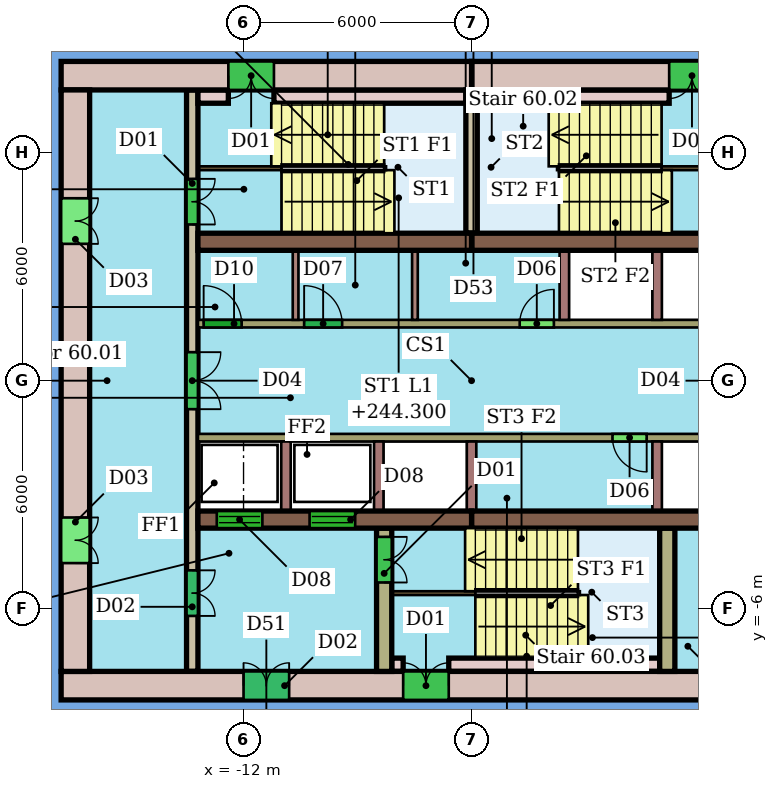
"""IFC4 building model, lengths in metres.
Left out: names, types, materials, properties, quantities, classifications, styles, units other than length and angle.
Written with IfcOpenShell. Run it as: python <this file> out.ifc"""

import sys

from ifc_helpers import new_model, si_unit, direction, frame, frame_2d, origin, place, context, subcontext, project, spatial, rectangle, extrude, element, fill, save


model = new_model("IFC4")
c1 = context("Model", 3, precision=1e-05, world=origin(), true_north=direction((0.0, 1.0)))
c2 = subcontext(c1, "Body", "Model", "MODEL_VIEW")
j1 = project(units=[si_unit("LENGTHUNIT", "METRE"), si_unit("PLANEANGLEUNIT", "RADIAN")], contexts=[c1])
p1 = place(None, origin())
s1 = spatial("IfcSite", under=j1, at=p1, CompositionType="ELEMENT")
p2 = place(p1, origin())
s2 = spatial("IfcBuilding", under=s1, at=p2, CompositionType="ELEMENT")
p3 = place(p2, frame((0.0, 0.0, 242.5)))
s3 = spatial("IfcBuildingStorey", under=s2, at=p3, CompositionType="ELEMENT", Elevation=242.5)
p4 = place(p3, frame((4.8, 8.025, 0.0), z_axis=(0.0, 0.0, 1.0), x_axis=(-1.0, 0.0, 0.0)))
e1 = element("IfcWall", 1, at=p4, inside=s3, PredefinedType="SHEAR", context=c2, shape_type="SweptSolid", body=[
    extrude(rectangle(XDim=10.8, YDim=0.75, at=frame_2d((5.4, 0.0))), origin(), (0.0, 0.0, 1.0), 3.3),
])
p5 = place(p4, frame((4.4, 0.0, 0.0)))
e2 = element("IfcOpeningElement", 2, at=p5, cuts=e1, PredefinedType="OPENING", context=c2, shape_type="SweptSolid", body=[
    extrude(rectangle(XDim=1.2, YDim=2.1, at=frame_2d((0.6, 1.05))), frame((0.0, 0.385, 0.0), z_axis=(0.0, -1.0, 0.0), x_axis=(1.0, 0.0, 0.0)), (0.0, 0.0, 1.0), 0.77),
])
p6 = place(p3, frame((-6.0, 8.025, 0.0), z_axis=(0.0, 0.0, 1.0), x_axis=(-1.0, 0.0, 0.0)))
e3 = element("IfcWall", 3, at=p6, inside=s3, PredefinedType="SHEAR", context=c2, shape_type="SweptSolid", body=[
    extrude(rectangle(XDim=10.8, YDim=0.75, at=frame_2d((5.4, 0.0))), origin(), (0.0, 0.0, 1.0), 3.3),
])
p7 = place(p6, frame((5.2, 0.0, 0.0)))
e4 = element("IfcOpeningElement", 4, at=p7, cuts=e3, PredefinedType="OPENING", context=c2, shape_type="SweptSolid", body=[
    extrude(rectangle(XDim=1.2, YDim=2.1, at=frame_2d((0.6, 1.05))), frame((0.0, 0.385, 0.0), z_axis=(0.0, -1.0, 0.0), x_axis=(1.0, 0.0, 0.0)), (0.0, 0.0, 1.0), 0.77),
])
p8 = place(p3, frame((-16.8, -8.025, 0.0), z_axis=(0.0, 0.0, 1.0), x_axis=(1.0, 0.0, 0.0)))
e5 = element("IfcWall", 5, at=p8, inside=s3, PredefinedType="SHEAR", context=c2, shape_type="SweptSolid", body=[
    extrude(rectangle(XDim=21.6, YDim=0.75, at=frame_2d((10.8, 0.0))), origin(), (0.0, 0.0, 1.0), 3.3),
])
p9 = place(p8, frame((9.0, 0.0, 0.0)))
e6 = element("IfcOpeningElement", 6, at=p9, cuts=e5, PredefinedType="OPENING", context=c2, shape_type="SweptSolid", body=[
    extrude(rectangle(XDim=1.2, YDim=2.1, at=frame_2d((0.6, 1.05))), frame((0.0, 0.385, 0.0), z_axis=(0.0, -1.0, 0.0), x_axis=(1.0, 0.0, 0.0)), (0.0, 0.0, 1.0), 0.77),
])
p10 = place(p8, frame((4.8, 0.0, 0.0)))
e7 = element("IfcOpeningElement", 7, at=p10, cuts=e5, PredefinedType="OPENING", context=c2, shape_type="SweptSolid", body=[
    extrude(rectangle(XDim=1.2, YDim=2.1, at=frame_2d((0.6, 1.05))), frame((0.0, 0.385, 0.0), z_axis=(0.0, -1.0, 0.0), x_axis=(1.0, 0.0, 0.0)), (0.0, 0.0, 1.0), 0.77),
])
p11 = place(p3, frame((-16.425, 7.65, 0.0), z_axis=(0.0, 0.0, 1.0), x_axis=(0.0, -1.0, 0.0)))
e8 = element("IfcWall", 8, at=p11, inside=s3, PredefinedType="SHEAR", context=c2, shape_type="SweptSolid", body=[
    extrude(rectangle(XDim=15.3, YDim=0.75, at=frame_2d((7.65, 0.0))), origin(), (0.0, 0.0, 1.0), 3.3),
])
p12 = place(p11, frame((11.25, 0.0, 0.0)))
e9 = element("IfcOpeningElement", 9, at=p12, cuts=e8, PredefinedType="OPENING", context=c2, shape_type="SweptSolid", body=[
    extrude(rectangle(XDim=1.2, YDim=2.1, at=frame_2d((0.6, 1.05))), frame((0.0, 0.385, 0.0), z_axis=(0.0, -1.0, 0.0), x_axis=(1.0, 0.0, 0.0)), (0.0, 0.0, 1.0), 0.77),
])
p13 = place(p11, frame((2.85, 0.0, 0.0)))
e10 = element("IfcOpeningElement", 10, at=p13, cuts=e8, PredefinedType="OPENING", context=c2, shape_type="SweptSolid", body=[
    extrude(rectangle(XDim=1.2, YDim=2.1, at=frame_2d((0.6, 1.05))), frame((0.0, 0.385, 0.0), z_axis=(0.0, -1.0, 0.0), x_axis=(1.0, 0.0, 0.0)), (0.0, 0.0, 1.0), 0.77),
])
for number, where, z_axis, x_axis in (
    (11, (-13.2, 3.655, 0.0), (0.0, 0.0, 1.0), (1.0, 0.0, 0.0)),
    (12, (-6.0, 3.655, 0.0), (0.0, 0.0, 1.0), (1.0, 0.0, 0.0)),
):
    element("IfcWall", number, at=place(p3, frame(where, z_axis=z_axis, x_axis=x_axis)), inside=s3, PredefinedType="SHEAR", context=c2, shape_type="SweptSolid", body=[
        extrude(rectangle(XDim=7.2, YDim=0.45, at=frame_2d((3.6, 0.0))), origin(), (0.0, 0.0, 1.0), 3.3),
    ])
p14 = place(p3, frame((-13.2, -3.655, 0.0), z_axis=(0.0, 0.0, 1.0), x_axis=(1.0, 0.0, 0.0)))
e13 = element("IfcWall", 13, at=p14, inside=s3, PredefinedType="SHEAR", context=c2, shape_type="SweptSolid", body=[
    extrude(rectangle(XDim=7.2, YDim=0.45, at=frame_2d((3.6, 0.0))), origin(), (0.0, 0.0, 1.0), 3.3),
])
p15 = place(p14, frame((0.496, 0.0, 0.0)))
e14 = element("IfcOpeningElement", 14, at=p15, cuts=e13, PredefinedType="OPENING", context=c2, shape_type="SweptSolid", body=[
    extrude(rectangle(XDim=1.2, YDim=2.1, at=frame_2d((0.6, 1.05))), frame((0.0, 0.235, 0.0), z_axis=(0.0, -1.0, 0.0), x_axis=(1.0, 0.0, 0.0)), (0.0, 0.0, 1.0), 0.47),
])
p16 = place(p14, frame((2.938, 0.0, 0.0)))
e15 = element("IfcOpeningElement", 15, at=p16, cuts=e13, PredefinedType="OPENING", context=c2, shape_type="SweptSolid", body=[
    extrude(rectangle(XDim=1.2, YDim=2.1, at=frame_2d((0.6, 1.05))), frame((0.0, 0.235, 0.0), z_axis=(0.0, -1.0, 0.0), x_axis=(1.0, 0.0, 0.0)), (0.0, 0.0, 1.0), 0.47),
])
p17 = place(p3, frame((-6.0, -3.655, 0.0), z_axis=(0.0, 0.0, 1.0), x_axis=(1.0, 0.0, 0.0)))
e16 = element("IfcWall", 16, at=p17, inside=s3, PredefinedType="SHEAR", context=c2, shape_type="SweptSolid", body=[
    extrude(rectangle(XDim=7.2, YDim=0.45, at=frame_2d((3.6, 0.0))), origin(), (0.0, 0.0, 1.0), 3.3),
])
p18 = place(p3, frame((-13.35, 7.65, 0.0), z_axis=(0.0, 0.0, 1.0), x_axis=(0.0, -1.0, 0.0)))
e17 = element("IfcWall", 17, at=p18, inside=s3, PredefinedType="SHEAR", context=c2, shape_type="SweptSolid", body=[
    extrude(rectangle(XDim=15.3, YDim=0.3, at=frame_2d((7.65, 0.0))), origin(), (0.0, 0.0, 1.0), 3.3),
])
p19 = place(p18, frame((2.34, 0.0, 0.0)))
e18 = element("IfcOpeningElement", 18, at=p19, cuts=e17, PredefinedType="OPENING", context=c2, shape_type="SweptSolid", body=[
    extrude(rectangle(XDim=1.2, YDim=2.1, at=frame_2d((0.6, 1.05))), frame((0.0, 0.16, 0.0), z_axis=(0.0, -1.0, 0.0), x_axis=(1.0, 0.0, 0.0)), (0.0, 0.0, 1.0), 0.32),
])
p20 = place(p18, frame((12.64, 0.0, 0.0)))
e19 = element("IfcOpeningElement", 19, at=p20, cuts=e17, PredefinedType="OPENING", context=c2, shape_type="SweptSolid", body=[
    extrude(rectangle(XDim=1.2, YDim=2.1, at=frame_2d((0.6, 1.05))), frame((0.0, 0.16, 0.0), z_axis=(0.0, -1.0, 0.0), x_axis=(1.0, 0.0, 0.0)), (0.0, 0.0, 1.0), 0.32),
])
p21 = place(p18, frame((6.9, 0.0, 0.0)))
e20 = element("IfcOpeningElement", 20, at=p21, cuts=e17, PredefinedType="OPENING", context=c2, shape_type="SweptSolid", body=[
    extrude(rectangle(XDim=1.5, YDim=2.1, at=frame_2d((0.75, 1.05))), frame((0.0, 0.16, 0.0), z_axis=(0.0, -1.0, 0.0), x_axis=(1.0, 0.0, 0.0)), (0.0, 0.0, 1.0), 0.32),
])
p22 = place(p3, frame((-13.2, 1.5, 0.0), z_axis=(0.0, 0.0, 1.0), x_axis=(1.0, 0.0, 0.0)))
e21 = element("IfcWall", 21, at=p22, inside=s3, PredefinedType="SHEAR", context=c2, shape_type="SweptSolid", body=[
    extrude(rectangle(XDim=14.4, YDim=0.2, at=frame_2d((7.2, 0.0))), origin(), (0.0, 0.0, 1.0), 3.3),
])
p23 = place(p22, frame((0.15, 0.0, 0.0)))
e22 = element("IfcOpeningElement", 22, at=p23, cuts=e21, PredefinedType="OPENING", context=c2, shape_type="SweptSolid", body=[
    extrude(rectangle(XDim=1.0, YDim=2.1, at=frame_2d((0.5, 1.05))), frame((0.0, 0.11, 0.0), z_axis=(0.0, -1.0, 0.0), x_axis=(1.0, 0.0, 0.0)), (0.0, 0.0, 1.0), 0.22),
])
p24 = place(p22, frame((2.794, 0.0, 0.0)))
e23 = element("IfcOpeningElement", 23, at=p24, cuts=e21, PredefinedType="OPENING", context=c2, shape_type="SweptSolid", body=[
    extrude(rectangle(XDim=1.0, YDim=2.1, at=frame_2d((0.5, 1.05))), frame((0.0, 0.11, 0.0), z_axis=(0.0, -1.0, 0.0), x_axis=(1.0, 0.0, 0.0)), (0.0, 0.0, 1.0), 0.22),
])
p25 = place(p22, frame((8.467, 0.0, 0.0)))
e24 = element("IfcOpeningElement", 24, at=p25, cuts=e21, PredefinedType="OPENING", context=c2, shape_type="SweptSolid", body=[
    extrude(rectangle(XDim=0.9, YDim=2.1, at=frame_2d((0.45, 1.05))), frame((0.0, 0.11, 0.0), z_axis=(0.0, -1.0, 0.0), x_axis=(1.0, 0.0, 0.0)), (0.0, 0.0, 1.0), 0.22),
])
p26 = place(p3, frame((1.2, -1.5, 0.0), z_axis=(0.0, 0.0, 1.0), x_axis=(-1.0, 0.0, 0.0)))
e25 = element("IfcWall", 25, at=p26, inside=s3, PredefinedType="SHEAR", context=c2, shape_type="SweptSolid", body=[
    extrude(rectangle(XDim=14.4, YDim=0.2, at=frame_2d((7.2, 0.0))), origin(), (0.0, 0.0, 1.0), 3.3),
])
p27 = place(p26, frame((2.592, 0.0, 0.0)))
e26 = element("IfcOpeningElement", 26, at=p27, cuts=e25, PredefinedType="OPENING", context=c2, shape_type="SweptSolid", body=[
    extrude(rectangle(XDim=0.9, YDim=2.1, at=frame_2d((0.45, 1.05))), frame((0.0, 0.11, 0.0), z_axis=(0.0, -1.0, 0.0), x_axis=(1.0, 0.0, 0.0)), (0.0, 0.0, 1.0), 0.22),
])
p28 = place(p3, frame((-8.3, -3.88, 0.0), z_axis=(0.0, 0.0, 1.0), x_axis=(0.0, -1.0, 0.0)))
e27 = element("IfcWall", 27, at=p28, inside=s3, PredefinedType="SHEAR", context=c2, shape_type="SweptSolid", body=[
    extrude(rectangle(XDim=3.77, YDim=0.4, at=frame_2d((1.885, 0.0))), origin(), (0.0, 0.0, 1.0), 3.3),
])
p29 = place(p28, frame((0.23, 0.0, 0.0)))
e28 = element("IfcOpeningElement", 28, at=p29, cuts=e27, PredefinedType="OPENING", context=c2, shape_type="SweptSolid", body=[
    extrude(rectangle(XDim=1.2, YDim=2.1, at=frame_2d((0.6, 1.05))), frame((0.0, 0.21, 0.0), z_axis=(0.0, -1.0, 0.0), x_axis=(1.0, 0.0, 0.0)), (0.0, 0.0, 1.0), 0.42),
])
p30 = place(p3, frame((-0.85, -3.88, 0.0), z_axis=(0.0, 0.0, 1.0), x_axis=(0.0, -1.0, 0.0)))
e29 = element("IfcWall", 29, at=p30, inside=s3, PredefinedType="SHEAR", context=c2, shape_type="SweptSolid", body=[
    extrude(rectangle(XDim=3.77, YDim=0.4, at=frame_2d((1.885, 0.0))), origin(), (0.0, 0.0, 1.0), 3.3),
])
p31 = place(p3, frame((-6.0, 3.88, 0.0), z_axis=(0.0, 0.0, 1.0), x_axis=(0.0, 1.0, 0.0)))
e30 = element("IfcWall", 30, at=p31, inside=s3, PredefinedType="SHEAR", context=c2, shape_type="SweptSolid", body=[
    extrude(rectangle(XDim=3.77, YDim=0.3, at=frame_2d((1.885, 0.0))), origin(), (0.0, 0.0, 1.0), 3.3),
])
p32 = place(p3, frame((-13.2, 7.475, 0.0), z_axis=(0.0, 0.0, 1.0), x_axis=(1.0, 0.0, 0.0)))
e31 = element("IfcWall", 31, at=p32, inside=s3, PredefinedType="SHEAR", context=c2, shape_type="SweptSolid", body=[
    extrude(rectangle(XDim=0.8, YDim=0.35, at=frame_2d((0.4, 0.0))), origin(), (0.0, 0.0, 1.0), 3.3),
])
for number, where, z_axis, x_axis in (
    (32, (-11.2, 7.475, 0.0), (0.0, 0.0, 1.0), (1.0, 0.0, 0.0)),
    (33, (-5.85, 7.475, 0.0), (0.0, 0.0, 1.0), (1.0, 0.0, 0.0)),
):
    element("IfcWall", number, at=place(p3, frame(where, z_axis=z_axis, x_axis=x_axis)), inside=s3, PredefinedType="SHEAR", context=c2, shape_type="SweptSolid", body=[
        extrude(rectangle(XDim=5.05, YDim=0.35, at=frame_2d((2.525, 0.0))), origin(), (0.0, 0.0, 1.0), 3.3),
    ])
p33 = place(p3, frame((-8.1, -7.475, 0.0), z_axis=(0.0, 0.0, 1.0), x_axis=(1.0, 0.0, 0.0)))
e34 = element("IfcWall", 34, at=p33, inside=s3, PredefinedType="SHEAR", context=c2, shape_type="SweptSolid", body=[
    extrude(rectangle(XDim=0.3, YDim=0.35, at=frame_2d((0.15, 0.0))), origin(), (0.0, 0.0, 1.0), 3.3),
])
p34 = place(p3, frame((-6.6, -7.475, 0.0), z_axis=(0.0, 0.0, 1.0), x_axis=(1.0, 0.0, 0.0)))
e35 = element("IfcWall", 35, at=p34, inside=s3, PredefinedType="SHEAR", context=c2, shape_type="SweptSolid", body=[
    extrude(rectangle(XDim=5.55, YDim=0.35, at=frame_2d((2.775, 0.0))), origin(), (0.0, 0.0, 1.0), 3.3),
])
for number, where, z_axis, x_axis in (
    (36, (-13.2, 5.59, 0.0), (0.0, 0.0, 1.0), (1.0, 0.0, 0.0)),
    (37, (1.2, 5.59, 0.0), (0.0, 0.0, 1.0), (-1.0, 0.0, 0.0)),
):
    element("IfcWall", number, at=place(p3, frame(where, z_axis=z_axis, x_axis=x_axis)), inside=s3, PredefinedType="SHEAR", context=c2, shape_type="SweptSolid", body=[
        extrude(rectangle(XDim=2.2, YDim=0.1, at=frame_2d((1.1, 0.0))), origin(), (0.0, 0.0, 1.0), 3.3),
    ])
p35 = place(p3, frame((-8.1, -5.59, 0.0), z_axis=(0.0, 0.0, 1.0), x_axis=(1.0, 0.0, 0.0)))
e38 = element("IfcWall", 38, at=p35, inside=s3, PredefinedType="SHEAR", context=c2, shape_type="SweptSolid", body=[
    extrude(rectangle(XDim=2.2, YDim=0.1, at=frame_2d((1.1, 0.0))), origin(), (0.0, 0.0, 1.0), 3.3),
])
for number, where, z_axis, x_axis in (
    (39, (-3.558, 1.6, 0.0), (0.0, 0.0, 1.0), (0.0, 1.0, 0.0)),
    (40, (-1.117, 1.6, 0.0), (0.0, 0.0, 1.0), (0.0, 1.0, 0.0)),
):
    element("IfcWall", number, at=place(p3, frame(where, z_axis=z_axis, x_axis=x_axis)), inside=s3, PredefinedType="SHEAR", context=c2, shape_type="SweptSolid", body=[
        extrude(rectangle(XDim=1.83, YDim=0.25, at=frame_2d((0.915, 0.0))), origin(), (0.0, 0.0, 1.0), 3.3),
    ])
for number, where, z_axis, x_axis in (
    (41, (-10.631, 1.6, 0.0), (0.0, 0.0, 1.0), (0.0, 1.0, 0.0)),
    (42, (-7.49, 1.6, 0.0), (0.0, 0.0, 1.0), (0.0, 1.0, 0.0)),
):
    element("IfcWall", number, at=place(p3, frame(where, z_axis=z_axis, x_axis=x_axis)), inside=s3, PredefinedType="PARTITIONING", context=c2, shape_type="SweptSolid", body=[
        extrude(rectangle(XDim=1.83, YDim=0.15, at=frame_2d((0.915, 0.0))), origin(), (0.0, 0.0, 1.0), 3.3),
    ])
for number, where, z_axis, x_axis in (
    (43, (-10.883, -1.6, 0.0), (0.0, 0.0, 1.0), (0.0, -1.0, 0.0)),
    (44, (-8.442, -1.6, 0.0), (0.0, 0.0, 1.0), (0.0, -1.0, 0.0)),
    (45, (-6.0, -1.6, 0.0), (0.0, 0.0, 1.0), (0.0, -1.0, 0.0)),
    (46, (-1.117, -1.6, 0.0), (0.0, 0.0, 1.0), (0.0, -1.0, 0.0)),
):
    element("IfcWall", number, at=place(p3, frame(where, z_axis=z_axis, x_axis=x_axis)), inside=s3, PredefinedType="SHEAR", context=c2, shape_type="SweptSolid", body=[
        extrude(rectangle(XDim=1.83, YDim=0.25, at=frame_2d((0.915, 0.0))), origin(), (0.0, 0.0, 1.0), 3.3),
    ])
p36 = place(p5, origin())
e47 = element("IfcDoor", 47, at=p36, inside=s3, OperationType="DOUBLE_DOOR_SINGLE_SWING", PredefinedType="NOTDEFINED", context=c2, shape_type="SweptSolid", body=[
    extrude(rectangle(XDim=1.2, YDim=2.1, at=frame_2d((0.6, 1.05))), frame((0.0, 0.025, 0.0), z_axis=(0.0, -1.0, 0.0), x_axis=(1.0, 0.0, 0.0)), (0.0, 0.0, 1.0), 0.05),
])
fill(e2, e47)
p37 = place(p7, origin())
e48 = element("IfcDoor", 48, at=p37, inside=s3, OperationType="DOUBLE_DOOR_SINGLE_SWING", PredefinedType="NOTDEFINED", context=c2, shape_type="SweptSolid", body=[
    extrude(rectangle(XDim=1.2, YDim=2.1, at=frame_2d((0.6, 1.05))), frame((0.0, 0.025, 0.0), z_axis=(0.0, -1.0, 0.0), x_axis=(1.0, 0.0, 0.0)), (0.0, 0.0, 1.0), 0.05),
])
fill(e4, e48)
p38 = place(p9, origin())
e49 = element("IfcDoor", 49, at=p38, inside=s3, OperationType="DOUBLE_DOOR_SINGLE_SWING", PredefinedType="NOTDEFINED", context=c2, shape_type="SweptSolid", body=[
    extrude(rectangle(XDim=1.2, YDim=2.1, at=frame_2d((0.6, 1.05))), frame((0.0, 0.025, 0.0), z_axis=(0.0, -1.0, 0.0), x_axis=(1.0, 0.0, 0.0)), (0.0, 0.0, 1.0), 0.05),
])
fill(e6, e49)
p39 = place(p10, origin())
e50 = element("IfcDoor", 50, at=p39, inside=s3, OperationType="DOUBLE_DOOR_SINGLE_SWING", PredefinedType="NOTDEFINED", context=c2, shape_type="SweptSolid", body=[
    extrude(rectangle(XDim=1.2, YDim=2.1, at=frame_2d((0.6, 1.05))), frame((0.0, 0.025, 0.0), z_axis=(0.0, -1.0, 0.0), x_axis=(1.0, 0.0, 0.0)), (0.0, 0.0, 1.0), 0.05),
])
fill(e7, e50)
p40 = place(p12, origin())
e51 = element("IfcDoor", 51, at=p40, inside=s3, OperationType="DOUBLE_DOOR_SINGLE_SWING", PredefinedType="NOTDEFINED", context=c2, shape_type="SweptSolid", body=[
    extrude(rectangle(XDim=1.2, YDim=2.1, at=frame_2d((0.6, 1.05))), frame((0.0, 0.025, 0.0), z_axis=(0.0, -1.0, 0.0), x_axis=(1.0, 0.0, 0.0)), (0.0, 0.0, 1.0), 0.05),
])
fill(e9, e51)
p41 = place(p13, origin())
e52 = element("IfcDoor", 52, at=p41, inside=s3, OperationType="DOUBLE_DOOR_SINGLE_SWING", PredefinedType="NOTDEFINED", context=c2, shape_type="SweptSolid", body=[
    extrude(rectangle(XDim=1.2, YDim=2.1, at=frame_2d((0.6, 1.05))), frame((0.0, 0.025, 0.0), z_axis=(0.0, -1.0, 0.0), x_axis=(1.0, 0.0, 0.0)), (0.0, 0.0, 1.0), 0.05),
])
fill(e10, e52)
p42 = place(p15, origin())
e53 = element("IfcDoor", 53, at=p42, inside=s3, OperationType="DOUBLE_DOOR_SLIDING", PredefinedType="NOTDEFINED", context=c2, shape_type="SweptSolid", body=[
    extrude(rectangle(XDim=1.2, YDim=2.1, at=frame_2d((0.6, 1.05))), frame((0.0, 0.025, 0.0), z_axis=(0.0, -1.0, 0.0), x_axis=(1.0, 0.0, 0.0)), (0.0, 0.0, 1.0), 0.05),
])
fill(e14, e53)
p43 = place(p16, origin())
e54 = element("IfcDoor", 54, at=p43, inside=s3, OperationType="DOUBLE_DOOR_SLIDING", PredefinedType="NOTDEFINED", context=c2, shape_type="SweptSolid", body=[
    extrude(rectangle(XDim=1.2, YDim=2.1, at=frame_2d((0.6, 1.05))), frame((0.0, 0.025, 0.0), z_axis=(0.0, -1.0, 0.0), x_axis=(1.0, 0.0, 0.0)), (0.0, 0.0, 1.0), 0.05),
])
fill(e15, e54)
p44 = place(p19, origin())
e55 = element("IfcDoor", 55, at=p44, inside=s3, OperationType="DOUBLE_DOOR_SINGLE_SWING", PredefinedType="NOTDEFINED", context=c2, shape_type="SweptSolid", body=[
    extrude(rectangle(XDim=1.2, YDim=2.1, at=frame_2d((0.6, 1.05))), frame((0.0, 0.025, 0.0), z_axis=(0.0, -1.0, 0.0), x_axis=(1.0, 0.0, 0.0)), (0.0, 0.0, 1.0), 0.05),
])
fill(e18, e55)
p45 = place(p20, origin())
e56 = element("IfcDoor", 56, at=p45, inside=s3, OperationType="DOUBLE_DOOR_SINGLE_SWING", PredefinedType="NOTDEFINED", context=c2, shape_type="SweptSolid", body=[
    extrude(rectangle(XDim=1.2, YDim=2.1, at=frame_2d((0.6, 1.05))), frame((0.0, 0.025, 0.0), z_axis=(0.0, -1.0, 0.0), x_axis=(1.0, 0.0, 0.0)), (0.0, 0.0, 1.0), 0.05),
])
fill(e19, e56)
p46 = place(p21, origin())
e57 = element("IfcDoor", 57, at=p46, inside=s3, OperationType="DOUBLE_DOOR_SINGLE_SWING", PredefinedType="NOTDEFINED", context=c2, shape_type="SweptSolid", body=[
    extrude(rectangle(XDim=1.5, YDim=2.1, at=frame_2d((0.75, 1.05))), frame((0.0, 0.025, 0.0), z_axis=(0.0, -1.0, 0.0), x_axis=(1.0, 0.0, 0.0)), (0.0, 0.0, 1.0), 0.05),
])
fill(e20, e57)
p47 = place(p23, origin())
e58 = element("IfcDoor", 58, at=p47, inside=s3, OperationType="SINGLE_SWING_LEFT", PredefinedType="NOTDEFINED", context=c2, shape_type="SweptSolid", body=[
    extrude(rectangle(XDim=1.0, YDim=2.1, at=frame_2d((0.5, 1.05))), frame((0.0, 0.025, 0.0), z_axis=(0.0, -1.0, 0.0), x_axis=(1.0, 0.0, 0.0)), (0.0, 0.0, 1.0), 0.05),
])
fill(e22, e58)
p48 = place(p24, origin())
e59 = element("IfcDoor", 59, at=p48, inside=s3, OperationType="SINGLE_SWING_LEFT", PredefinedType="NOTDEFINED", context=c2, shape_type="SweptSolid", body=[
    extrude(rectangle(XDim=1.0, YDim=2.1, at=frame_2d((0.5, 1.05))), frame((0.0, 0.025, 0.0), z_axis=(0.0, -1.0, 0.0), x_axis=(1.0, 0.0, 0.0)), (0.0, 0.0, 1.0), 0.05),
])
fill(e23, e59)
p49 = place(p25, origin())
e60 = element("IfcDoor", 60, at=p49, inside=s3, OperationType="SINGLE_SWING_RIGHT", PredefinedType="NOTDEFINED", context=c2, shape_type="SweptSolid", body=[
    extrude(rectangle(XDim=0.9, YDim=2.1, at=frame_2d((0.45, 1.05))), frame((0.0, 0.025, 0.0), z_axis=(0.0, -1.0, 0.0), x_axis=(1.0, 0.0, 0.0)), (0.0, 0.0, 1.0), 0.05),
])
fill(e24, e60)
p50 = place(p27, origin())
e61 = element("IfcDoor", 61, at=p50, inside=s3, OperationType="SINGLE_SWING_LEFT", PredefinedType="NOTDEFINED", context=c2, shape_type="SweptSolid", body=[
    extrude(rectangle(XDim=0.9, YDim=2.1, at=frame_2d((0.45, 1.05))), frame((0.0, 0.025, 0.0), z_axis=(0.0, -1.0, 0.0), x_axis=(1.0, 0.0, 0.0)), (0.0, 0.0, 1.0), 0.05),
])
fill(e26, e61)
p51 = place(p29, origin())
e62 = element("IfcDoor", 62, at=p51, inside=s3, OperationType="DOUBLE_DOOR_SINGLE_SWING", PredefinedType="NOTDEFINED", context=c2, shape_type="SweptSolid", body=[
    extrude(rectangle(XDim=1.2, YDim=2.1, at=frame_2d((0.6, 1.05))), frame((0.0, 0.025, 0.0), z_axis=(0.0, -1.0, 0.0), x_axis=(1.0, 0.0, 0.0)), (0.0, 0.0, 1.0), 0.05),
])
fill(e28, e62)
save(model, sys.argv[1])
